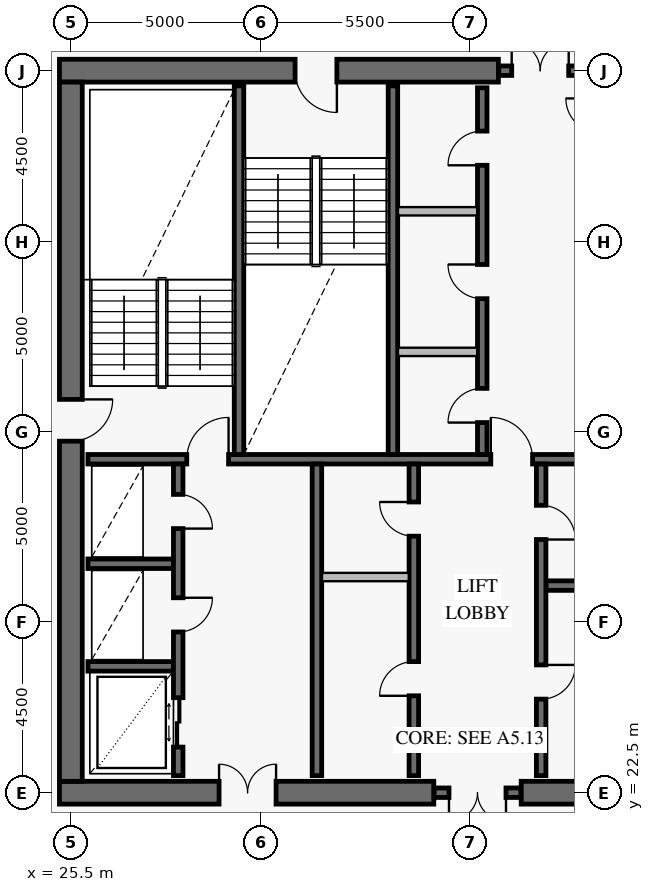
"""IFC4 building model, lengths in metres.
Left out: names, types, materials, properties, quantities, classifications, styles, units other than length and angle.
Written with IfcOpenShell. Run it as: python <this file> out.ifc"""

import sys

from ifc_helpers import new_model, si_unit, direction, frame, frame_2d, origin, place, context, subcontext, project, spatial, rectangle, extrude, element, fill, save


model = new_model("IFC4")
c1 = context("Model", 3, precision=1e-05, world=origin(), true_north=direction((0.0, 1.0)))
c2 = subcontext(c1, "Body", "Model", "MODEL_VIEW")
j1 = project(units=[si_unit("LENGTHUNIT", "METRE"), si_unit("PLANEANGLEUNIT", "RADIAN")], contexts=[c1])
p1 = place(None, origin())
s1 = spatial("IfcSite", under=j1, at=p1, CompositionType="ELEMENT")
p2 = place(p1, origin())
s2 = spatial("IfcBuilding", under=s1, at=p2, CompositionType="ELEMENT")
p3 = place(p2, frame((0.0, 0.0, 288.2)))
s3 = spatial("IfcBuildingStorey", under=s2, at=p3, CompositionType="ELEMENT", Elevation=288.2)
p4 = place(p3, frame((25.2, 22.5, 0.0), z_axis=(0.0, 0.0, 1.0), x_axis=(1.0, 0.0, 0.0)))
e1 = element("IfcWall", 1, at=p4, inside=s3, PredefinedType="SHEAR", context=c2, shape_type="SweptSolid", body=[
    extrude(rectangle(XDim=9.85, YDim=0.6, at=frame_2d((4.925, 0.0))), origin(), (0.0, 0.0, 1.0), 3.8),
])
p5 = place(p4, frame((4.2, 0.0, 0.0)))
e2 = element("IfcOpeningElement", 2, at=p5, cuts=e1, PredefinedType="OPENING", context=c2, shape_type="SweptSolid", body=[
    extrude(rectangle(XDim=1.5, YDim=2.15, at=frame_2d((0.75, 1.075))), frame((0.0, 0.312, 0.0), z_axis=(0.0, -1.0, 0.0), x_axis=(1.0, 0.0, 0.0)), (0.0, 0.0, 1.0), 0.624),
])
p6 = place(p3, frame((37.35, 22.5, 0.0), z_axis=(0.0, 0.0, 1.0), x_axis=(1.0, 0.0, 0.0)))
e3 = element("IfcWall", 3, at=p6, inside=s3, PredefinedType="SHEAR", context=c2, shape_type="SweptSolid", body=[
    extrude(rectangle(XDim=9.45, YDim=0.6, at=frame_2d((4.725, 0.0))), origin(), (0.0, 0.0, 1.0), 3.8),
])
p7 = place(p6, frame((3.95, 0.0, 0.0)))
e4 = element("IfcOpeningElement", 4, at=p7, cuts=e3, PredefinedType="OPENING", context=c2, shape_type="SweptSolid", body=[
    extrude(rectangle(XDim=1.5, YDim=2.15, at=frame_2d((0.75, 1.075))), frame((0.0, 0.312, 0.0), z_axis=(0.0, -1.0, 0.0), x_axis=(1.0, 0.0, 0.0)), (0.0, 0.0, 1.0), 0.624),
])
p8 = place(p3, frame((36.75, 41.5, 0.0), z_axis=(0.0, 0.0, 1.0), x_axis=(-1.0, 0.0, 0.0)))
e5 = element("IfcWall", 5, at=p8, inside=s3, PredefinedType="SHEAR", context=c2, shape_type="SweptSolid", body=[
    extrude(rectangle(XDim=11.55, YDim=0.6, at=frame_2d((5.775, 0.0))), origin(), (0.0, 0.0, 1.0), 3.8),
])
p9 = place(p8, frame((4.25, 0.0, 0.0)))
e6 = element("IfcOpeningElement", 6, at=p9, cuts=e5, PredefinedType="OPENING", context=c2, shape_type="SweptSolid", body=[
    extrude(rectangle(XDim=1.1, YDim=2.15, at=frame_2d((0.55, 1.075))), frame((0.0, 0.312, 0.0), z_axis=(0.0, -1.0, 0.0), x_axis=(1.0, 0.0, 0.0)), (0.0, 0.0, 1.0), 0.624),
])
p10 = place(p3, frame((25.5, 22.8, 0.0), z_axis=(0.0, 0.0, 1.0), x_axis=(0.0, 1.0, 0.0)))
e7 = element("IfcWall", 7, at=p10, inside=s3, PredefinedType="SHEAR", context=c2, shape_type="SweptSolid", body=[
    extrude(rectangle(XDim=18.4, YDim=0.6, at=frame_2d((9.2, 0.0))), origin(), (0.0, 0.0, 1.0), 3.8),
])
p11 = place(p10, frame((8.95, 0.0, 0.0)))
e8 = element("IfcOpeningElement", 8, at=p11, cuts=e7, PredefinedType="OPENING", context=c2, shape_type="SweptSolid", body=[
    extrude(rectangle(XDim=1.1, YDim=2.15, at=frame_2d((0.55, 1.075))), frame((0.0, 0.312, 0.0), z_axis=(0.0, -1.0, 0.0), x_axis=(1.0, 0.0, 0.0)), (0.0, 0.0, 1.0), 0.624),
])
p12 = place(p3, frame((35.06, 22.5, 0.0), z_axis=(0.0, 0.0, 1.0), x_axis=(1.0, 0.0, 0.0)))
e9 = element("IfcWall", 9, at=p12, inside=s3, PredefinedType="SOLIDWALL", context=c2, shape_type="SweptSolid", body=[
    extrude(rectangle(XDim=2.28, YDim=0.25, at=frame_2d((1.14, 0.0))), origin(), (0.0, 0.0, 1.0), 3.8),
])
p13 = place(p12, frame((0.39, 0.0, 0.0)))
e10 = element("IfcOpeningElement", 10, at=p13, cuts=e9, PredefinedType="OPENING", context=c2, shape_type="SweptSolid", body=[
    extrude(rectangle(XDim=1.5, YDim=2.15, at=frame_2d((0.75, 1.075))), frame((0.0, 0.137, 0.0), z_axis=(0.0, -1.0, 0.0), x_axis=(1.0, 0.0, 0.0)), (0.0, 0.0, 1.0), 0.274),
])
p14 = place(p3, frame((36.76, 41.5, 0.0), z_axis=(0.0, 0.0, 1.0), x_axis=(1.0, 0.0, 0.0)))
e11 = element("IfcWall", 11, at=p14, inside=s3, PredefinedType="SOLIDWALL", context=c2, shape_type="SweptSolid", body=[
    extrude(rectangle(XDim=2.18, YDim=0.25, at=frame_2d((1.09, 0.0))), origin(), (0.0, 0.0, 1.0), 3.8),
])
p15 = place(p14, frame((0.34, 0.0, 0.0)))
e12 = element("IfcOpeningElement", 12, at=p15, cuts=e11, PredefinedType="OPENING", context=c2, shape_type="SweptSolid", body=[
    extrude(rectangle(XDim=1.5, YDim=2.15, at=frame_2d((0.75, 1.075))), frame((0.0, 0.137, 0.0), z_axis=(0.0, -1.0, 0.0), x_axis=(1.0, 0.0, 0.0)), (0.0, 0.0, 1.0), 0.274),
])
p16 = place(p3, frame((25.95, 31.275, 0.0), z_axis=(0.0, 0.0, 1.0), x_axis=(1.0, 0.0, 0.0)))
e13 = element("IfcWall", 13, at=p16, inside=s3, PredefinedType="SOLIDWALL", context=c2, shape_type="SweptSolid", body=[
    extrude(rectangle(XDim=20.1, YDim=0.25, at=frame_2d((10.05, 0.0))), origin(), (0.0, 0.0, 1.0), 3.8),
])
p17 = place(p16, frame((2.6, 0.0, 0.0)))
e14 = element("IfcOpeningElement", 14, at=p17, cuts=e13, PredefinedType="OPENING", context=c2, shape_type="SweptSolid", body=[
    extrude(rectangle(XDim=1.1, YDim=2.15, at=frame_2d((0.55, 1.075))), frame((0.0, 0.137, 0.0), z_axis=(0.0, -1.0, 0.0), x_axis=(1.0, 0.0, 0.0)), (0.0, 0.0, 1.0), 0.274),
])
p18 = place(p16, frame((10.6, 0.0, 0.0)))
e15 = element("IfcOpeningElement", 15, at=p18, cuts=e13, PredefinedType="OPENING", context=c2, shape_type="SweptSolid", body=[
    extrude(rectangle(XDim=1.1, YDim=2.15, at=frame_2d((0.55, 1.075))), frame((0.0, 0.137, 0.0), z_axis=(0.0, -1.0, 0.0), x_axis=(1.0, 0.0, 0.0)), (0.0, 0.0, 1.0), 0.274),
])
p19 = place(p16, frame((16.35, 0.0, 0.0)))
e16 = element("IfcOpeningElement", 16, at=p19, cuts=e13, PredefinedType="OPENING", context=c2, shape_type="SweptSolid", body=[
    extrude(rectangle(XDim=1.1, YDim=2.15, at=frame_2d((0.55, 1.075))), frame((0.0, 0.137, 0.0), z_axis=(0.0, -1.0, 0.0), x_axis=(1.0, 0.0, 0.0)), (0.0, 0.0, 1.0), 0.274),
])
for number, where, z_axis, x_axis in (
    (17, (29.925, 31.4, 0.0), (0.0, 0.0, 1.0), (0.0, 1.0, 0.0)),
    (18, (33.975, 31.4, 0.0), (0.0, 0.0, 1.0), (0.0, 1.0, 0.0)),
):
    element("IfcWall", number, at=place(p3, frame(where, z_axis=z_axis, x_axis=x_axis)), inside=s3, PredefinedType="SOLIDWALL", context=c2, shape_type="SweptSolid", body=[
        extrude(rectangle(XDim=9.7, YDim=0.25, at=frame_2d((4.85, 0.0))), origin(), (0.0, 0.0, 1.0), 3.8),
    ])
p20 = place(p3, frame((36.325, 31.4, 0.0), z_axis=(0.0, 0.0, 1.0), x_axis=(0.0, 1.0, 0.0)))
e19 = element("IfcWall", 19, at=p20, inside=s3, PredefinedType="SOLIDWALL", context=c2, shape_type="SweptSolid", body=[
    extrude(rectangle(XDim=9.65, YDim=0.25, at=frame_2d((4.825, 0.0))), origin(), (0.0, 0.0, 1.0), 3.8),
])
p21 = place(p20, frame((0.84, 0.0, 0.0)))
e20 = element("IfcOpeningElement", 20, at=p21, cuts=e19, PredefinedType="OPENING", context=c2, shape_type="SweptSolid", body=[
    extrude(rectangle(XDim=0.9, YDim=2.1, at=frame_2d((0.45, 1.05))), frame((0.0, 0.137, 0.0), z_axis=(0.0, -1.0, 0.0), x_axis=(1.0, 0.0, 0.0)), (0.0, 0.0, 1.0), 0.274),
])
p22 = place(p20, frame((4.1, 0.0, 0.0)))
e21 = element("IfcOpeningElement", 21, at=p22, cuts=e19, PredefinedType="OPENING", context=c2, shape_type="SweptSolid", body=[
    extrude(rectangle(XDim=0.9, YDim=2.1, at=frame_2d((0.45, 1.05))), frame((0.0, 0.137, 0.0), z_axis=(0.0, -1.0, 0.0), x_axis=(1.0, 0.0, 0.0)), (0.0, 0.0, 1.0), 0.274),
])
p23 = place(p20, frame((7.61, 0.0, 0.0)))
e22 = element("IfcOpeningElement", 22, at=p23, cuts=e19, PredefinedType="OPENING", context=c2, shape_type="SweptSolid", body=[
    extrude(rectangle(XDim=0.9, YDim=2.1, at=frame_2d((0.45, 1.05))), frame((0.0, 0.137, 0.0), z_axis=(0.0, -1.0, 0.0), x_axis=(1.0, 0.0, 0.0)), (0.0, 0.0, 1.0), 0.274),
])
for number, where, z_axis, x_axis in (
    (23, (25.95, 25.825, 0.0), (0.0, 0.0, 1.0), (1.0, 0.0, 0.0)),
    (24, (25.95, 28.525, 0.0), (0.0, 0.0, 1.0), (1.0, 0.0, 0.0)),
):
    element("IfcWall", number, at=place(p3, frame(where, z_axis=z_axis, x_axis=x_axis)), inside=s3, PredefinedType="SOLIDWALL", context=c2, shape_type="SweptSolid", body=[
        extrude(rectangle(XDim=2.25, YDim=0.25, at=frame_2d((1.125, 0.0))), origin(), (0.0, 0.0, 1.0), 3.8),
    ])
p24 = place(p3, frame((28.325, 22.95, 0.0), z_axis=(0.0, 0.0, 1.0), x_axis=(0.0, 1.0, 0.0)))
e25 = element("IfcWall", 25, at=p24, inside=s3, PredefinedType="SOLIDWALL", context=c2, shape_type="SweptSolid", body=[
    extrude(rectangle(XDim=8.2, YDim=0.25, at=frame_2d((4.1, 0.0))), origin(), (0.0, 0.0, 1.0), 3.8),
])
p25 = place(p24, frame((0.75, 0.0, 0.0)))
e26 = element("IfcOpeningElement", 26, at=p25, cuts=e25, PredefinedType="OPENING", context=c2, shape_type="SweptSolid", body=[
    extrude(rectangle(XDim=1.3, YDim=2.3, at=frame_2d((0.65, 1.15))), frame((0.0, 0.137, 0.0), z_axis=(0.0, -1.0, 0.0), x_axis=(1.0, 0.0, 0.0)), (0.0, 0.0, 1.0), 0.274),
])
p26 = place(p24, frame((3.78, 0.0, 0.0)))
e27 = element("IfcOpeningElement", 27, at=p26, cuts=e25, PredefinedType="OPENING", context=c2, shape_type="SweptSolid", body=[
    extrude(rectangle(XDim=0.9, YDim=2.1, at=frame_2d((0.45, 1.05))), frame((0.0, 0.137, 0.0), z_axis=(0.0, -1.0, 0.0), x_axis=(1.0, 0.0, 0.0)), (0.0, 0.0, 1.0), 0.274),
])
p27 = place(p24, frame((6.5, 0.0, 0.0)))
e28 = element("IfcOpeningElement", 28, at=p27, cuts=e25, PredefinedType="OPENING", context=c2, shape_type="SweptSolid", body=[
    extrude(rectangle(XDim=0.9, YDim=2.1, at=frame_2d((0.45, 1.05))), frame((0.0, 0.137, 0.0), z_axis=(0.0, -1.0, 0.0), x_axis=(1.0, 0.0, 0.0)), (0.0, 0.0, 1.0), 0.274),
])
p28 = place(p3, frame((31.975, 22.95, 0.0), z_axis=(0.0, 0.0, 1.0), x_axis=(0.0, 1.0, 0.0)))
e29 = element("IfcWall", 29, at=p28, inside=s3, PredefinedType="SOLIDWALL", context=c2, shape_type="SweptSolid", body=[
    extrude(rectangle(XDim=8.2, YDim=0.25, at=frame_2d((4.1, 0.0))), origin(), (0.0, 0.0, 1.0), 3.8),
])
p29 = place(p3, frame((34.525, 22.95, 0.0), z_axis=(0.0, 0.0, 1.0), x_axis=(0.0, 1.0, 0.0)))
e30 = element("IfcWall", 30, at=p29, inside=s3, PredefinedType="SOLIDWALL", context=c2, shape_type="SweptSolid", body=[
    extrude(rectangle(XDim=8.2, YDim=0.25, at=frame_2d((4.1, 0.0))), origin(), (0.0, 0.0, 1.0), 3.8),
])
p30 = place(p29, frame((2.1, 0.0, 0.0)))
e31 = element("IfcOpeningElement", 31, at=p30, cuts=e30, PredefinedType="OPENING", context=c2, shape_type="SweptSolid", body=[
    extrude(rectangle(XDim=0.9, YDim=2.1, at=frame_2d((0.45, 1.05))), frame((0.0, 0.137, 0.0), z_axis=(0.0, -1.0, 0.0), x_axis=(1.0, 0.0, 0.0)), (0.0, 0.0, 1.0), 0.274),
])
p31 = place(p29, frame((6.3, 0.0, 0.0)))
e32 = element("IfcOpeningElement", 32, at=p31, cuts=e30, PredefinedType="OPENING", context=c2, shape_type="SweptSolid", body=[
    extrude(rectangle(XDim=0.9, YDim=2.1, at=frame_2d((0.45, 1.05))), frame((0.0, 0.137, 0.0), z_axis=(0.0, -1.0, 0.0), x_axis=(1.0, 0.0, 0.0)), (0.0, 0.0, 1.0), 0.274),
])
p32 = place(p3, frame((38.0, 27.95, 0.0), z_axis=(0.0, 0.0, 1.0), x_axis=(1.0, 0.0, 0.0)))
e33 = element("IfcWall", 33, at=p32, inside=s3, PredefinedType="SOLIDWALL", context=c2, shape_type="SweptSolid", body=[
    extrude(rectangle(XDim=2.3, YDim=0.25, at=frame_2d((1.15, 0.0))), origin(), (0.0, 0.0, 1.0), 3.8),
])
p33 = place(p3, frame((37.875, 22.95, 0.0), z_axis=(0.0, 0.0, 1.0), x_axis=(0.0, 1.0, 0.0)))
e34 = element("IfcWall", 34, at=p33, inside=s3, PredefinedType="SOLIDWALL", context=c2, shape_type="SweptSolid", body=[
    extrude(rectangle(XDim=8.2, YDim=0.25, at=frame_2d((4.1, 0.0))), origin(), (0.0, 0.0, 1.0), 3.8),
])
p34 = place(p33, frame((2.012, 0.0, 0.0)))
e35 = element("IfcOpeningElement", 35, at=p34, cuts=e34, PredefinedType="OPENING", context=c2, shape_type="SweptSolid", body=[
    extrude(rectangle(XDim=0.9, YDim=2.1, at=frame_2d((0.45, 1.05))), frame((0.0, 0.137, 0.0), z_axis=(0.0, -1.0, 0.0), x_axis=(1.0, 0.0, 0.0)), (0.0, 0.0, 1.0), 0.274),
])
p35 = place(p33, frame((6.212, 0.0, 0.0)))
e36 = element("IfcOpeningElement", 36, at=p35, cuts=e34, PredefinedType="OPENING", context=c2, shape_type="SweptSolid", body=[
    extrude(rectangle(XDim=0.9, YDim=2.1, at=frame_2d((0.45, 1.05))), frame((0.0, 0.137, 0.0), z_axis=(0.0, -1.0, 0.0), x_axis=(1.0, 0.0, 0.0)), (0.0, 0.0, 1.0), 0.274),
])
for number, where, z_axis, x_axis in (
    (37, (34.108, 34.1, 0.0), (0.0, 0.0, 1.0), (1.0, 0.0, 0.0)),
    (38, (34.108, 37.8, 0.0), (0.0, 0.0, 1.0), (1.0, 0.0, 0.0)),
):
    element("IfcWall", number, at=place(p3, frame(where, z_axis=z_axis, x_axis=x_axis)), inside=s3, PredefinedType="PARTITIONING", context=c2, shape_type="SweptSolid", body=[
        extrude(rectangle(XDim=2.084, YDim=0.22, at=frame_2d((1.042, 0.0))), origin(), (0.0, 0.0, 1.0), 3.55),
    ])
p36 = place(p3, frame((32.108, 28.175, 0.0), z_axis=(0.0, 0.0, 1.0), x_axis=(1.0, 0.0, 0.0)))
e39 = element("IfcWall", 39, at=p36, inside=s3, PredefinedType="PARTITIONING", context=c2, shape_type="SweptSolid", body=[
    extrude(rectangle(XDim=2.284, YDim=0.22, at=frame_2d((1.142, 0.0))), origin(), (0.0, 0.0, 1.0), 3.55),
])
p37 = place(p11, frame((1.1, 0.0, 0.0), z_axis=(0.0, 0.0, 1.0), x_axis=(-1.0, 0.0, 0.0)))
e40 = element("IfcDoor", 40, at=p37, inside=s3, OperationType="SINGLE_SWING_LEFT", PredefinedType="USERDEFINED", context=c2, shape_type="SweptSolid", body=[
    extrude(rectangle(XDim=1.1, YDim=2.15, at=frame_2d((0.55, 1.075))), frame((0.0, 0.025, 0.0), z_axis=(0.0, -1.0, 0.0), x_axis=(1.0, 0.0, 0.0)), (0.0, 0.0, 1.0), 0.05),
])
fill(e8, e40)
p38 = place(p9, origin())
e41 = element("IfcDoor", 41, at=p38, inside=s3, OperationType="SINGLE_SWING_LEFT", PredefinedType="USERDEFINED", context=c2, shape_type="SweptSolid", body=[
    extrude(rectangle(XDim=1.1, YDim=2.15, at=frame_2d((0.55, 1.075))), frame((0.0, 0.025, 0.0), z_axis=(0.0, -1.0, 0.0), x_axis=(1.0, 0.0, 0.0)), (0.0, 0.0, 1.0), 0.05),
])
fill(e6, e41)
p39 = place(p5, origin())
e42 = element("IfcDoor", 42, at=p39, inside=s3, OperationType="DOUBLE_DOOR_SINGLE_SWING", PredefinedType="DOOR", context=c2, shape_type="SweptSolid", body=[
    extrude(rectangle(XDim=1.5, YDim=2.15, at=frame_2d((0.75, 1.075))), frame((0.0, 0.025, 0.0), z_axis=(0.0, -1.0, 0.0), x_axis=(1.0, 0.0, 0.0)), (0.0, 0.0, 1.0), 0.05),
])
fill(e2, e42)
p40 = place(p13, frame((1.5, 0.0, 0.0), z_axis=(0.0, 0.0, 1.0), x_axis=(-1.0, 0.0, 0.0)))
e43 = element("IfcDoor", 43, at=p40, inside=s3, OperationType="DOUBLE_DOOR_SINGLE_SWING", PredefinedType="DOOR", context=c2, shape_type="SweptSolid", body=[
    extrude(rectangle(XDim=1.5, YDim=2.15, at=frame_2d((0.75, 1.075))), frame((0.0, 0.025, 0.0), z_axis=(0.0, -1.0, 0.0), x_axis=(1.0, 0.0, 0.0)), (0.0, 0.0, 1.0), 0.05),
])
fill(e10, e43)
p41 = place(p15, origin())
e44 = element("IfcDoor", 44, at=p41, inside=s3, OperationType="DOUBLE_DOOR_SINGLE_SWING", PredefinedType="DOOR", context=c2, shape_type="SweptSolid", body=[
    extrude(rectangle(XDim=1.5, YDim=2.15, at=frame_2d((0.75, 1.075))), frame((0.0, 0.025, 0.0), z_axis=(0.0, -1.0, 0.0), x_axis=(1.0, 0.0, 0.0)), (0.0, 0.0, 1.0), 0.05),
])
fill(e12, e44)
p42 = place(p17, origin())
e45 = element("IfcDoor", 45, at=p42, inside=s3, OperationType="SINGLE_SWING_RIGHT", PredefinedType="USERDEFINED", context=c2, shape_type="SweptSolid", body=[
    extrude(rectangle(XDim=1.1, YDim=2.15, at=frame_2d((0.55, 1.075))), frame((0.0, 0.025, 0.0), z_axis=(0.0, -1.0, 0.0), x_axis=(1.0, 0.0, 0.0)), (0.0, 0.0, 1.0), 0.05),
])
fill(e14, e45)
p43 = place(p18, origin())
e46 = element("IfcDoor", 46, at=p43, inside=s3, OperationType="SINGLE_SWING_LEFT", PredefinedType="USERDEFINED", context=c2, shape_type="SweptSolid", body=[
    extrude(rectangle(XDim=1.1, YDim=2.15, at=frame_2d((0.55, 1.075))), frame((0.0, 0.025, 0.0), z_axis=(0.0, -1.0, 0.0), x_axis=(1.0, 0.0, 0.0)), (0.0, 0.0, 1.0), 0.05),
])
fill(e15, e46)
p44 = place(p21, origin())
e47 = element("IfcDoor", 47, at=p44, inside=s3, OperationType="SINGLE_SWING_LEFT", PredefinedType="DOOR", context=c2, shape_type="SweptSolid", body=[
    extrude(rectangle(XDim=0.9, YDim=2.1, at=frame_2d((0.45, 1.05))), frame((0.0, 0.025, 0.0), z_axis=(0.0, -1.0, 0.0), x_axis=(1.0, 0.0, 0.0)), (0.0, 0.0, 1.0), 0.05),
])
fill(e20, e47)
p45 = place(p22, origin())
e48 = element("IfcDoor", 48, at=p45, inside=s3, OperationType="SINGLE_SWING_RIGHT", PredefinedType="DOOR", context=c2, shape_type="SweptSolid", body=[
    extrude(rectangle(XDim=0.9, YDim=2.1, at=frame_2d((0.45, 1.05))), frame((0.0, 0.025, 0.0), z_axis=(0.0, -1.0, 0.0), x_axis=(1.0, 0.0, 0.0)), (0.0, 0.0, 1.0), 0.05),
])
fill(e21, e48)
p46 = place(p23, origin())
e49 = element("IfcDoor", 49, at=p46, inside=s3, OperationType="SINGLE_SWING_LEFT", PredefinedType="DOOR", context=c2, shape_type="SweptSolid", body=[
    extrude(rectangle(XDim=0.9, YDim=2.1, at=frame_2d((0.45, 1.05))), frame((0.0, 0.025, 0.0), z_axis=(0.0, -1.0, 0.0), x_axis=(1.0, 0.0, 0.0)), (0.0, 0.0, 1.0), 0.05),
])
fill(e22, e49)
p47 = place(p25, frame((1.3, 0.0, 0.0), z_axis=(0.0, 0.0, 1.0), x_axis=(-1.0, 0.0, 0.0)))
e50 = element("IfcDoor", 50, at=p47, inside=s3, OperationType="DOUBLE_DOOR_SLIDING", PredefinedType="DOOR", context=c2, shape_type="SweptSolid", body=[
    extrude(rectangle(XDim=1.3, YDim=2.3, at=frame_2d((0.65, 1.15))), frame((0.0, 0.025, 0.0), z_axis=(0.0, -1.0, 0.0), x_axis=(1.0, 0.0, 0.0)), (0.0, 0.0, 1.0), 0.05),
])
fill(e26, e50)
p48 = place(p26, frame((0.9, 0.0, 0.0), z_axis=(0.0, 0.0, 1.0), x_axis=(-1.0, 0.0, 0.0)))
e51 = element("IfcDoor", 51, at=p48, inside=s3, OperationType="SINGLE_SWING_LEFT", PredefinedType="DOOR", context=c2, shape_type="SweptSolid", body=[
    extrude(rectangle(XDim=0.9, YDim=2.1, at=frame_2d((0.45, 1.05))), frame((0.0, 0.025, 0.0), z_axis=(0.0, -1.0, 0.0), x_axis=(1.0, 0.0, 0.0)), (0.0, 0.0, 1.0), 0.05),
])
fill(e27, e51)
p49 = place(p27, frame((0.9, 0.0, 0.0), z_axis=(0.0, 0.0, 1.0), x_axis=(-1.0, 0.0, 0.0)))
e52 = element("IfcDoor", 52, at=p49, inside=s3, OperationType="SINGLE_SWING_RIGHT", PredefinedType="DOOR", context=c2, shape_type="SweptSolid", body=[
    extrude(rectangle(XDim=0.9, YDim=2.1, at=frame_2d((0.45, 1.05))), frame((0.0, 0.025, 0.0), z_axis=(0.0, -1.0, 0.0), x_axis=(1.0, 0.0, 0.0)), (0.0, 0.0, 1.0), 0.05),
])
fill(e28, e52)
p50 = place(p30, origin())
e53 = element("IfcDoor", 53, at=p50, inside=s3, OperationType="SINGLE_SWING_LEFT", PredefinedType="DOOR", context=c2, shape_type="SweptSolid", body=[
    extrude(rectangle(XDim=0.9, YDim=2.1, at=frame_2d((0.45, 1.05))), frame((0.0, 0.025, 0.0), z_axis=(0.0, -1.0, 0.0), x_axis=(1.0, 0.0, 0.0)), (0.0, 0.0, 1.0), 0.05),
])
fill(e31, e53)
p51 = place(p31, origin())
e54 = element("IfcDoor", 54, at=p51, inside=s3, OperationType="SINGLE_SWING_RIGHT", PredefinedType="DOOR", context=c2, shape_type="SweptSolid", body=[
    extrude(rectangle(XDim=0.9, YDim=2.1, at=frame_2d((0.45, 1.05))), frame((0.0, 0.025, 0.0), z_axis=(0.0, -1.0, 0.0), x_axis=(1.0, 0.0, 0.0)), (0.0, 0.0, 1.0), 0.05),
])
fill(e32, e54)
p52 = place(p34, frame((0.9, 0.0, 0.0), z_axis=(0.0, 0.0, 1.0), x_axis=(-1.0, 0.0, 0.0)))
e55 = element("IfcDoor", 55, at=p52, inside=s3, OperationType="SINGLE_SWING_LEFT", PredefinedType="DOOR", context=c2, shape_type="SweptSolid", body=[
    extrude(rectangle(XDim=0.9, YDim=2.1, at=frame_2d((0.45, 1.05))), frame((0.0, 0.025, 0.0), z_axis=(0.0, -1.0, 0.0), x_axis=(1.0, 0.0, 0.0)), (0.0, 0.0, 1.0), 0.05),
])
fill(e35, e55)
p53 = place(p35, frame((0.9, 0.0, 0.0), z_axis=(0.0, 0.0, 1.0), x_axis=(-1.0, 0.0, 0.0)))
e56 = element("IfcDoor", 56, at=p53, inside=s3, OperationType="SINGLE_SWING_RIGHT", PredefinedType="DOOR", context=c2, shape_type="SweptSolid", body=[
    extrude(rectangle(XDim=0.9, YDim=2.1, at=frame_2d((0.45, 1.05))), frame((0.0, 0.025, 0.0), z_axis=(0.0, -1.0, 0.0), x_axis=(1.0, 0.0, 0.0)), (0.0, 0.0, 1.0), 0.05),
])
fill(e36, e56)
save(model, sys.argv[1])
